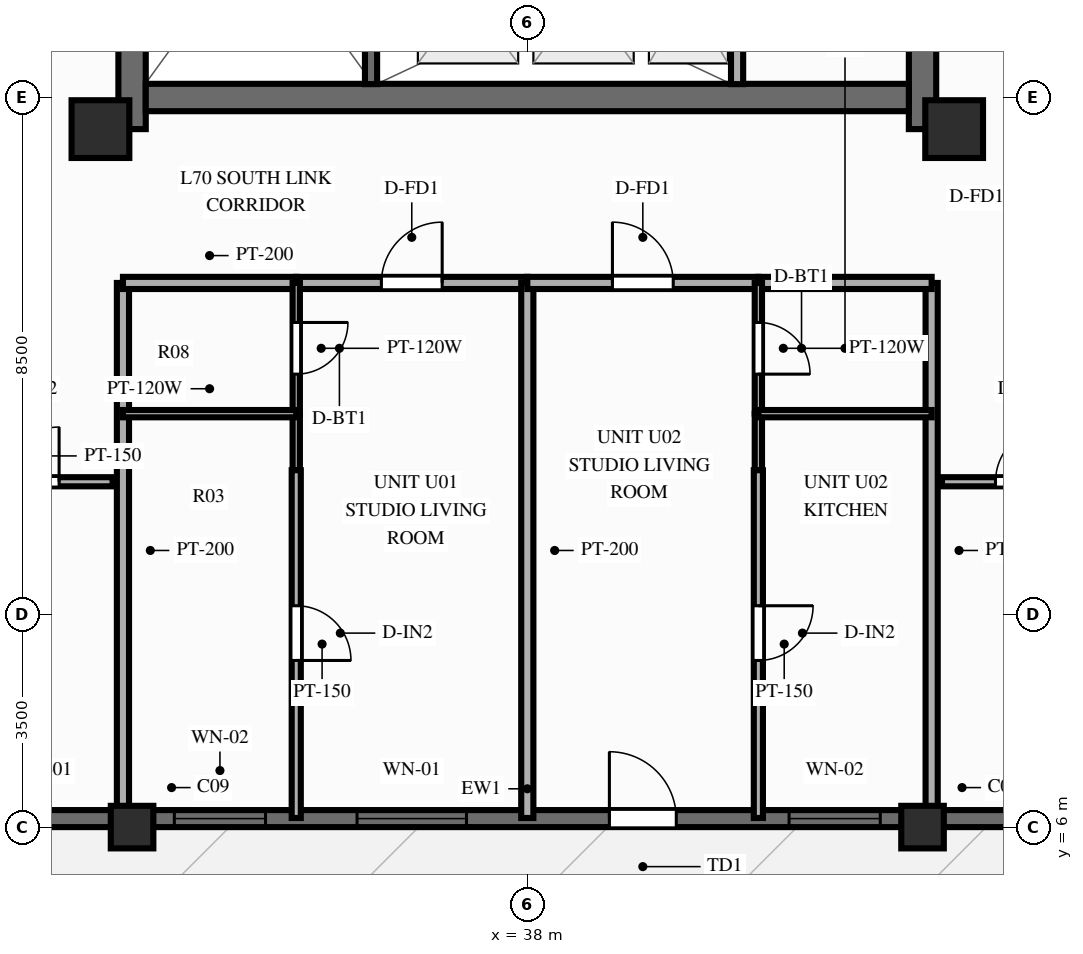
"""IFC4 building model, lengths in metres.
Left out: names, types, materials, properties, quantities, classifications, styles, units other than length and angle.
Written with IfcOpenShell. Run it as: python <this file> out.ifc"""

import sys

from ifc_helpers import new_model, si_unit, direction, frame, frame_2d, origin, origin_2d, place, context, subcontext, project, spatial, rectangle, extrude, source, transform, mapped, element, fill, save


model = new_model("IFC4")
c1 = context("Model", 3, precision=1e-05, world=origin(), true_north=direction((0.0, 1.0)))
c2 = subcontext(c1, "Body", "Model", "MODEL_VIEW")
j1 = project(units=[si_unit("LENGTHUNIT", "METRE"), si_unit("PLANEANGLEUNIT", "RADIAN")], contexts=[c1])
p1 = place(None, origin())
s1 = spatial("IfcSite", under=j1, at=p1, CompositionType="ELEMENT")
p2 = place(p1, origin())
s2 = spatial("IfcBuilding", under=s1, at=p2, CompositionType="ELEMENT")
p3 = place(p2, frame((0.0, 0.0, 226.2)))
s3 = spatial("IfcBuildingStorey", under=s2, at=p3, CompositionType="ELEMENT", Elevation=226.2)
p4 = place(p3, frame((31.5, 17.48, 0.0), z_axis=(0.0, 0.0, 1.0), x_axis=(0.0, 1.0, 0.0)))
e1 = element("IfcWall", 1, at=p4, inside=s3, PredefinedType="SHEAR", context=c2, shape_type="SweptSolid", body=[
    extrude(rectangle(XDim=19.04, YDim=0.45, at=frame_2d((9.52, 0.0))), origin(), (0.0, 0.0, 1.0), 3.9),
])
p5 = place(p4, frame((6.32, 0.0, 0.0)))
e2 = element("IfcOpeningElement", 2, at=p5, cuts=e1, PredefinedType="OPENING", context=c2, shape_type="SweptSolid", body=[
    extrude(rectangle(XDim=1.1, YDim=2.15, at=frame_2d((0.55, 1.075))), frame((0.0, 0.237, 0.0), z_axis=(0.0, -1.0, 0.0), x_axis=(1.0, 0.0, 0.0)), (0.0, 0.0, 1.0), 0.474),
])
p6 = place(p3, frame((44.5, 17.48, 0.0), z_axis=(0.0, 0.0, 1.0), x_axis=(0.0, 1.0, 0.0)))
e3 = element("IfcWall", 3, at=p6, inside=s3, PredefinedType="SHEAR", context=c2, shape_type="SweptSolid", body=[
    extrude(rectangle(XDim=19.04, YDim=0.45, at=frame_2d((9.52, 0.0))), origin(), (0.0, 0.0, 1.0), 3.9),
])
p7 = place(p6, frame((12.67, 0.0, 0.0), z_axis=(0.0, 0.0, 1.0), x_axis=(-1.0, 0.0, 0.0)))
e4 = element("IfcOpeningElement", 4, at=p7, cuts=e3, PredefinedType="OPENING", context=c2, shape_type="SweptSolid", body=[
    extrude(rectangle(XDim=1.1, YDim=2.15, at=frame_2d((0.55, 1.075))), frame((0.0, 0.237, 0.0), z_axis=(0.0, -1.0, 0.0), x_axis=(1.0, 0.0, 0.0)), (0.0, 0.0, 1.0), 0.474),
])
p8 = place(p3, frame((31.725, 18.0, 0.0), z_axis=(0.0, 0.0, 1.0), x_axis=(1.0, 0.0, 0.0)))
e5 = element("IfcWall", 5, at=p8, inside=s3, PredefinedType="SHEAR", context=c2, shape_type="SweptSolid", body=[
    extrude(rectangle(XDim=12.55, YDim=0.45, at=frame_2d((6.275, 0.0))), origin(), (0.0, 0.0, 1.0), 3.9),
])
m1 = source(origin(), c2, "Body", "SweptSolid", [
    extrude(rectangle(XDim=0.95, YDim=0.95, at=origin_2d()), origin(), (0.0, 0.0, 1.0), 3.9),
])
for number, where, z_axis, x_axis in (
    (6, (30.98, 17.48, 0.0), (0.0, 0.0, 1.0), (1.0, 0.0, 0.0)),
    (7, (45.02, 17.48, 0.0), (0.0, 0.0, 1.0), (1.0, 0.0, 0.0)),
):
    element("IfcColumn", number, at=place(p3, frame(where, z_axis=z_axis, x_axis=x_axis)), inside=s3, PredefinedType="COLUMN", context=c2, shape_type="MappedRepresentation", body=[
        mapped(m1, transform((0.0, 0.0, 0.0), scale=1.0)),
    ])
m2 = source(origin(), c2, "Body", "SweptSolid", [
    extrude(rectangle(XDim=0.7, YDim=0.7, at=origin_2d()), origin(), (0.0, 0.0, 1.0), 3.9),
])
for number, where, z_axis, x_axis in (
    (8, (31.5, 6.0, 0.0), (0.0, 0.0, 1.0), (1.0, 0.0, 0.0)),
    (9, (44.5, 6.0, 0.0), (0.0, 0.0, 1.0), (1.0, 0.0, 0.0)),
):
    element("IfcColumn", number, at=place(p3, frame(where, z_axis=z_axis, x_axis=x_axis)), inside=s3, PredefinedType="COLUMN", context=c2, shape_type="MappedRepresentation", body=[
        mapped(m2, transform((0.0, 0.0, 0.0), scale=1.0)),
    ])
p9 = place(p3, frame((26.75, 6.14, 0.0), z_axis=(0.0, 0.0, 1.0), x_axis=(1.0, 0.0, 0.0)))
e10 = element("IfcWall", 10, at=p9, inside=s3, PredefinedType="SOLIDWALL", context=c2, shape_type="SweptSolid", body=[
    extrude(rectangle(XDim=22.5, YDim=0.28, at=frame_2d((11.25, 0.0))), origin(), (0.0, 0.0, 1.0), 2.79),
])
p10 = place(p9, frame((1.475, 0.0, 0.85)))
e11 = element("IfcOpeningElement", 11, at=p10, cuts=e10, PredefinedType="OPENING", context=c2, shape_type="SweptSolid", body=[
    extrude(rectangle(XDim=1.8, YDim=1.65, at=frame_2d((0.9, 0.825))), frame((0.0, 0.152, 0.0), z_axis=(0.0, -1.0, 0.0), x_axis=(1.0, 0.0, 0.0)), (0.0, 0.0, 1.0), 0.304),
])
p11 = place(p9, frame((5.445, 0.0, 0.85)))
e12 = element("IfcOpeningElement", 12, at=p11, cuts=e10, PredefinedType="OPENING", context=c2, shape_type="SweptSolid", body=[
    extrude(rectangle(XDim=1.5, YDim=1.65, at=frame_2d((0.75, 0.825))), frame((0.0, 0.152, 0.0), z_axis=(0.0, -1.0, 0.0), x_axis=(1.0, 0.0, 0.0)), (0.0, 0.0, 1.0), 0.304),
])
p12 = place(p9, frame((8.45, 0.0, 0.85)))
e13 = element("IfcOpeningElement", 13, at=p12, cuts=e10, PredefinedType="OPENING", context=c2, shape_type="SweptSolid", body=[
    extrude(rectangle(XDim=1.8, YDim=1.65, at=frame_2d((0.9, 0.825))), frame((0.0, 0.152, 0.0), z_axis=(0.0, -1.0, 0.0), x_axis=(1.0, 0.0, 0.0)), (0.0, 0.0, 1.0), 0.304),
])
p13 = place(p9, frame((13.7, 0.0, 0.0), z_axis=(0.0, 0.0, 1.0), x_axis=(-1.0, 0.0, 0.0)))
e14 = element("IfcOpeningElement", 14, at=p13, cuts=e10, PredefinedType="OPENING", context=c2, shape_type="SweptSolid", body=[
    extrude(rectangle(XDim=1.1, YDim=2.15, at=frame_2d((0.55, 1.075))), frame((0.0, 0.152, 0.0), z_axis=(0.0, -1.0, 0.0), x_axis=(1.0, 0.0, 0.0)), (0.0, 0.0, 1.0), 0.304),
])
p14 = place(p9, frame((15.555, 0.0, 0.85)))
e15 = element("IfcOpeningElement", 15, at=p14, cuts=e10, PredefinedType="OPENING", context=c2, shape_type="SweptSolid", body=[
    extrude(rectangle(XDim=1.5, YDim=1.65, at=frame_2d((0.75, 0.825))), frame((0.0, 0.152, 0.0), z_axis=(0.0, -1.0, 0.0), x_axis=(1.0, 0.0, 0.0)), (0.0, 0.0, 1.0), 0.304),
])
p15 = place(p9, frame((19.225, 0.0, 0.85)))
e16 = element("IfcOpeningElement", 16, at=p15, cuts=e10, PredefinedType="OPENING", context=c2, shape_type="SweptSolid", body=[
    extrude(rectangle(XDim=1.8, YDim=1.65, at=frame_2d((0.9, 0.825))), frame((0.0, 0.152, 0.0), z_axis=(0.0, -1.0, 0.0), x_axis=(1.0, 0.0, 0.0)), (0.0, 0.0, 1.0), 0.304),
])
p16 = place(p3, frame((41.45, 18.22, 0.0), z_axis=(0.0, 0.0, 1.0), x_axis=(0.0, 1.0, 0.0)))
e17 = element("IfcWall", 17, at=p16, inside=s3, PredefinedType="PARTITIONING", context=c2, shape_type="SweptSolid", body=[
    extrude(rectangle(XDim=2.96, YDim=0.2, at=frame_2d((1.48, 0.0))), origin(), (0.0, 0.0, 1.0), 3.69),
])
p17 = place(p3, frame((35.43, 18.22, 0.0), z_axis=(0.0, 0.0, 1.0), x_axis=(0.0, 1.0, 0.0)))
e18 = element("IfcWall", 18, at=p17, inside=s3, PredefinedType="SOLIDWALL", context=c2, shape_type="SweptSolid", body=[
    extrude(rectangle(XDim=7.22, YDim=0.2, at=frame_2d((3.61, 0.0))), origin(), (0.0, 0.0, 1.0), 3.69),
])
p18 = place(p17, frame((6.68, 0.0, 0.0), z_axis=(0.0, 0.0, 1.0), x_axis=(-1.0, 0.0, 0.0)))
e19 = element("IfcOpeningElement", 19, at=p18, cuts=e18, PredefinedType="OPENING", context=c2, shape_type="SweptSolid", body=[
    extrude(rectangle(XDim=1.1, YDim=2.15, at=frame_2d((0.55, 1.075))), frame((0.0, 0.112, 0.0), z_axis=(0.0, -1.0, 0.0), x_axis=(1.0, 0.0, 0.0)), (0.0, 0.0, 1.0), 0.224),
])
p19 = place(p3, frame((28.85, 11.68, 0.0), z_axis=(0.0, 0.0, 1.0), x_axis=(1.0, 0.0, 0.0)))
e20 = element("IfcWall", 20, at=p19, inside=s3, PredefinedType="PARTITIONING", context=c2, shape_type="SweptSolid", body=[
    extrude(rectangle(XDim=2.33, YDim=0.15, at=frame_2d((1.165, 0.0))), origin(), (0.0, 0.0, 1.0), 3.69),
])
p20 = place(p19, frame((0.55, 0.0, 0.0)))
e21 = element("IfcOpeningElement", 21, at=p20, cuts=e20, PredefinedType="OPENING", context=c2, shape_type="SweptSolid", body=[
    extrude(rectangle(XDim=0.9, YDim=2.1, at=frame_2d((0.45, 1.05))), frame((0.0, 0.087, 0.0), z_axis=(0.0, -1.0, 0.0), x_axis=(1.0, 0.0, 0.0)), (0.0, 0.0, 1.0), 0.174),
])
p21 = place(p3, frame((44.82, 11.68, 0.0), z_axis=(0.0, 0.0, 1.0), x_axis=(1.0, 0.0, 0.0)))
e22 = element("IfcWall", 22, at=p21, inside=s3, PredefinedType="PARTITIONING", context=c2, shape_type="SweptSolid", body=[
    extrude(rectangle(XDim=2.33, YDim=0.15, at=frame_2d((1.165, 0.0))), origin(), (0.0, 0.0, 1.0), 3.69),
])
p22 = place(p21, frame((0.88, 0.0, 0.0)))
e23 = element("IfcOpeningElement", 23, at=p22, cuts=e22, PredefinedType="OPENING", context=c2, shape_type="SweptSolid", body=[
    extrude(rectangle(XDim=0.9, YDim=2.1, at=frame_2d((0.45, 1.05))), frame((0.0, 0.087, 0.0), z_axis=(0.0, -1.0, 0.0), x_axis=(1.0, 0.0, 0.0)), (0.0, 0.0, 1.0), 0.174),
])
for number, where, z_axis, x_axis in (
    (24, (31.35, 14.95, 0.0), (0.0, 0.0, 1.0), (0.0, -1.0, 0.0)),
    (25, (44.65, 14.95, 0.0), (0.0, 0.0, 1.0), (0.0, -1.0, 0.0)),
):
    element("IfcWall", number, at=place(p3, frame(where, z_axis=z_axis, x_axis=x_axis)), inside=s3, PredefinedType="PARTITIONING", context=c2, shape_type="SweptSolid", body=[
        extrude(rectangle(XDim=8.8, YDim=0.2, at=frame_2d((4.4, 0.0))), origin(), (0.0, 0.0, 1.0), 2.79),
    ])
p23 = place(p3, frame((31.35, 14.95, 0.0), z_axis=(0.0, 0.0, 1.0), x_axis=(1.0, 0.0, 0.0)))
e26 = element("IfcWall", 26, at=p23, inside=s3, PredefinedType="PARTITIONING", context=c2, shape_type="SweptSolid", body=[
    extrude(rectangle(XDim=2.85, YDim=0.2, at=frame_2d((1.425, 0.0))), origin(), (0.0, 0.0, 1.0), 3.69),
])
p24 = place(p3, frame((34.2, 14.95, 0.0), z_axis=(0.0, 0.0, 1.0), x_axis=(1.0, 0.0, 0.0)))
e27 = element("IfcWall", 27, at=p24, inside=s3, PredefinedType="PARTITIONING", context=c2, shape_type="SweptSolid", body=[
    extrude(rectangle(XDim=3.8, YDim=0.2, at=frame_2d((1.9, 0.0))), origin(), (0.0, 0.0, 1.0), 3.69),
])
p25 = place(p24, frame((1.4, 0.0, 0.0)))
e28 = element("IfcOpeningElement", 28, at=p25, cuts=e27, PredefinedType="OPENING", context=c2, shape_type="SweptSolid", body=[
    extrude(rectangle(XDim=1.0, YDim=2.15, at=frame_2d((0.5, 1.075))), frame((0.0, 0.112, 0.0), z_axis=(0.0, -1.0, 0.0), x_axis=(1.0, 0.0, 0.0)), (0.0, 0.0, 1.0), 0.224),
])
p26 = place(p3, frame((34.2, 14.95, 0.0), z_axis=(0.0, 0.0, 1.0), x_axis=(0.0, -1.0, 0.0)))
e29 = element("IfcWall", 29, at=p26, inside=s3, PredefinedType="PARTITIONING", context=c2, shape_type="SweptSolid", body=[
    extrude(rectangle(XDim=2.15, YDim=0.12, at=frame_2d((1.075, 0.0))), origin(), (0.0, 0.0, 1.0), 3.69),
])
p27 = place(p26, frame((0.65, 0.0, 0.0)))
e30 = element("IfcOpeningElement", 30, at=p27, cuts=e29, PredefinedType="OPENING", context=c2, shape_type="SweptSolid", body=[
    extrude(rectangle(XDim=0.85, YDim=2.05, at=frame_2d((0.425, 1.025))), frame((0.0, 0.072, 0.0), z_axis=(0.0, -1.0, 0.0), x_axis=(1.0, 0.0, 0.0)), (0.0, 0.0, 1.0), 0.144),
])
p28 = place(p3, frame((34.2, 12.8, 0.0), z_axis=(0.0, 0.0, 1.0), x_axis=(0.0, -1.0, 0.0)))
e31 = element("IfcWall", 31, at=p28, inside=s3, PredefinedType="PARTITIONING", context=c2, shape_type="SweptSolid", body=[
    extrude(rectangle(XDim=0.93, YDim=0.12, at=frame_2d((0.465, 0.0))), origin(), (0.0, 0.0, 1.0), 3.69),
])
p29 = place(p3, frame((31.35, 12.8, 0.0), z_axis=(0.0, 0.0, 1.0), x_axis=(1.0, 0.0, 0.0)))
e32 = element("IfcWall", 32, at=p29, inside=s3, PredefinedType="PARTITIONING", context=c2, shape_type="SweptSolid", body=[
    extrude(rectangle(XDim=2.85, YDim=0.12, at=frame_2d((1.425, 0.0))), origin(), (0.0, 0.0, 1.0), 3.69),
])
p30 = place(p3, frame((34.2, 11.87, 0.0), z_axis=(0.0, 0.0, 1.0), x_axis=(0.0, -1.0, 0.0)))
e33 = element("IfcWall", 33, at=p30, inside=s3, PredefinedType="PARTITIONING", context=c2, shape_type="SweptSolid", body=[
    extrude(rectangle(XDim=5.72, YDim=0.15, at=frame_2d((2.86, 0.0))), origin(), (0.0, 0.0, 1.0), 3.69),
])
p31 = place(p30, frame((2.229, 0.0, 0.0)))
e34 = element("IfcOpeningElement", 34, at=p31, cuts=e33, PredefinedType="OPENING", context=c2, shape_type="SweptSolid", body=[
    extrude(rectangle(XDim=0.9, YDim=2.1, at=frame_2d((0.45, 1.05))), frame((0.0, 0.087, 0.0), z_axis=(0.0, -1.0, 0.0), x_axis=(1.0, 0.0, 0.0)), (0.0, 0.0, 1.0), 0.174),
])
p32 = place(p3, frame((38.0, 14.95, 0.0), z_axis=(0.0, 0.0, 1.0), x_axis=(0.0, -1.0, 0.0)))
e35 = element("IfcWall", 35, at=p32, inside=s3, PredefinedType="PARTITIONING", context=c2, shape_type="SweptSolid", body=[
    extrude(rectangle(XDim=8.8, YDim=0.2, at=frame_2d((4.4, 0.0))), origin(), (0.0, 0.0, 1.0), 3.69),
])
p33 = place(p3, frame((38.0, 14.95, 0.0), z_axis=(0.0, 0.0, 1.0), x_axis=(1.0, 0.0, 0.0)))
e36 = element("IfcWall", 36, at=p33, inside=s3, PredefinedType="PARTITIONING", context=c2, shape_type="SweptSolid", body=[
    extrude(rectangle(XDim=3.8, YDim=0.2, at=frame_2d((1.9, 0.0))), origin(), (0.0, 0.0, 1.0), 3.69),
])
p34 = place(p33, frame((1.4, 0.0, 0.0)))
e37 = element("IfcOpeningElement", 37, at=p34, cuts=e36, PredefinedType="OPENING", context=c2, shape_type="SweptSolid", body=[
    extrude(rectangle(XDim=1.0, YDim=2.15, at=frame_2d((0.5, 1.075))), frame((0.0, 0.112, 0.0), z_axis=(0.0, -1.0, 0.0), x_axis=(1.0, 0.0, 0.0)), (0.0, 0.0, 1.0), 0.224),
])
p35 = place(p3, frame((41.8, 14.95, 0.0), z_axis=(0.0, 0.0, 1.0), x_axis=(1.0, 0.0, 0.0)))
e38 = element("IfcWall", 38, at=p35, inside=s3, PredefinedType="PARTITIONING", context=c2, shape_type="SweptSolid", body=[
    extrude(rectangle(XDim=2.85, YDim=0.2, at=frame_2d((1.425, 0.0))), origin(), (0.0, 0.0, 1.0), 3.69),
])
p36 = place(p3, frame((41.8, 14.95, 0.0), z_axis=(0.0, 0.0, 1.0), x_axis=(0.0, -1.0, 0.0)))
e39 = element("IfcWall", 39, at=p36, inside=s3, PredefinedType="PARTITIONING", context=c2, shape_type="SweptSolid", body=[
    extrude(rectangle(XDim=2.15, YDim=0.12, at=frame_2d((1.075, 0.0))), origin(), (0.0, 0.0, 1.0), 3.69),
])
p37 = place(p36, frame((0.65, 0.0, 0.0)))
e40 = element("IfcOpeningElement", 40, at=p37, cuts=e39, PredefinedType="OPENING", context=c2, shape_type="SweptSolid", body=[
    extrude(rectangle(XDim=0.85, YDim=2.05, at=frame_2d((0.425, 1.025))), frame((0.0, 0.072, 0.0), z_axis=(0.0, -1.0, 0.0), x_axis=(1.0, 0.0, 0.0)), (0.0, 0.0, 1.0), 0.144),
])
p38 = place(p3, frame((41.8, 12.8, 0.0), z_axis=(0.0, 0.0, 1.0), x_axis=(0.0, -1.0, 0.0)))
e41 = element("IfcWall", 41, at=p38, inside=s3, PredefinedType="PARTITIONING", context=c2, shape_type="SweptSolid", body=[
    extrude(rectangle(XDim=0.93, YDim=0.12, at=frame_2d((0.465, 0.0))), origin(), (0.0, 0.0, 1.0), 3.69),
])
p39 = place(p3, frame((41.8, 12.8, 0.0), z_axis=(0.0, 0.0, 1.0), x_axis=(1.0, 0.0, 0.0)))
e42 = element("IfcWall", 42, at=p39, inside=s3, PredefinedType="PARTITIONING", context=c2, shape_type="SweptSolid", body=[
    extrude(rectangle(XDim=2.85, YDim=0.12, at=frame_2d((1.425, 0.0))), origin(), (0.0, 0.0, 1.0), 3.69),
])
p40 = place(p3, frame((41.8, 11.87, 0.0), z_axis=(0.0, 0.0, 1.0), x_axis=(0.0, -1.0, 0.0)))
e43 = element("IfcWall", 43, at=p40, inside=s3, PredefinedType="PARTITIONING", context=c2, shape_type="SweptSolid", body=[
    extrude(rectangle(XDim=5.72, YDim=0.15, at=frame_2d((2.86, 0.0))), origin(), (0.0, 0.0, 1.0), 3.69),
])
p41 = place(p40, frame((2.229, 0.0, 0.0)))
e44 = element("IfcOpeningElement", 44, at=p41, cuts=e43, PredefinedType="OPENING", context=c2, shape_type="SweptSolid", body=[
    extrude(rectangle(XDim=0.9, YDim=2.1, at=frame_2d((0.45, 1.05))), frame((0.0, 0.087, 0.0), z_axis=(0.0, -1.0, 0.0), x_axis=(1.0, 0.0, 0.0)), (0.0, 0.0, 1.0), 0.174),
])
m3 = source(origin(), c2, "Body", "SweptSolid", [
    extrude(rectangle(XDim=1.5, YDim=1.65, at=frame_2d((0.75, 0.825))), frame((0.0, 0.03, 0.0), z_axis=(0.0, -1.0, 0.0), x_axis=(1.0, 0.0, 0.0)), (0.0, 0.0, 1.0), 0.06),
])
p42 = place(p11, origin())
e45 = element("IfcWindow", 45, at=p42, inside=s3, PartitioningType="SINGLE_PANEL", PredefinedType="WINDOW", context=c2, shape_type="MappedRepresentation", body=[
    mapped(m3, transform((0.0, 0.0, 0.0), scale=1.0)),
])
fill(e12, e45)
m4 = source(origin(), c2, "Body", "SweptSolid", [
    extrude(rectangle(XDim=1.8, YDim=1.65, at=frame_2d((0.9, 0.825))), frame((0.0, 0.03, 0.0), z_axis=(0.0, -1.0, 0.0), x_axis=(1.0, 0.0, 0.0)), (0.0, 0.0, 1.0), 0.06),
])
p43 = place(p12, origin())
e46 = element("IfcWindow", 46, at=p43, inside=s3, PartitioningType="SINGLE_PANEL", PredefinedType="WINDOW", context=c2, shape_type="MappedRepresentation", body=[
    mapped(m4, transform((0.0, 0.0, 0.0), scale=1.0)),
])
fill(e13, e46)
m5 = source(origin(), c2, "Body", "SweptSolid", [
    extrude(rectangle(XDim=1.1, YDim=2.15, at=frame_2d((0.55, 1.075))), frame((0.0, 0.025, 0.0), z_axis=(0.0, -1.0, 0.0), x_axis=(1.0, 0.0, 0.0)), (0.0, 0.0, 1.0), 0.05),
])
p44 = place(p13, origin())
e47 = element("IfcDoor", 47, at=p44, inside=s3, OperationType="SINGLE_SWING_RIGHT", PredefinedType="DOOR", context=c2, shape_type="MappedRepresentation", body=[
    mapped(m5, transform((0.0, 0.0, 0.0), scale=1.0)),
])
fill(e14, e47)
p45 = place(p14, origin())
e48 = element("IfcWindow", 48, at=p45, inside=s3, PartitioningType="SINGLE_PANEL", PredefinedType="WINDOW", context=c2, shape_type="MappedRepresentation", body=[
    mapped(m3, transform((0.0, 0.0, 0.0), scale=1.0)),
])
fill(e15, e48)
m6 = source(origin(), c2, "Body", "SweptSolid", [
    extrude(rectangle(XDim=0.9, YDim=2.1, at=frame_2d((0.45, 1.05))), frame((0.0, 0.025, 0.0), z_axis=(0.0, -1.0, 0.0), x_axis=(1.0, 0.0, 0.0)), (0.0, 0.0, 1.0), 0.05),
])
p46 = place(p20, origin())
e49 = element("IfcDoor", 49, at=p46, inside=s3, OperationType="SINGLE_SWING_RIGHT", PredefinedType="DOOR", context=c2, shape_type="MappedRepresentation", body=[
    mapped(m6, transform((0.0, 0.0, 0.0), scale=1.0)),
])
fill(e21, e49)
p47 = place(p22, origin())
e50 = element("IfcDoor", 50, at=p47, inside=s3, OperationType="SINGLE_SWING_RIGHT", PredefinedType="DOOR", context=c2, shape_type="MappedRepresentation", body=[
    mapped(m6, transform((0.0, 0.0, 0.0), scale=1.0)),
])
fill(e23, e50)
m7 = source(origin(), c2, "Body", "SweptSolid", [
    extrude(rectangle(XDim=1.0, YDim=2.15, at=frame_2d((0.5, 1.075))), frame((0.0, 0.025, 0.0), z_axis=(0.0, -1.0, 0.0), x_axis=(1.0, 0.0, 0.0)), (0.0, 0.0, 1.0), 0.05),
])
p48 = place(p25, origin())
e51 = element("IfcDoor", 51, at=p48, inside=s3, OperationType="SINGLE_SWING_RIGHT", PredefinedType="DOOR", context=c2, shape_type="MappedRepresentation", body=[
    mapped(m7, transform((0.0, 0.0, 0.0), scale=1.0)),
])
fill(e28, e51)
m8 = source(origin(), c2, "Body", "SweptSolid", [
    extrude(rectangle(XDim=0.85, YDim=2.05, at=frame_2d((0.425, 1.025))), frame((0.0, 0.025, 0.0), z_axis=(0.0, -1.0, 0.0), x_axis=(1.0, 0.0, 0.0)), (0.0, 0.0, 1.0), 0.05),
])
p49 = place(p27, origin())
e52 = element("IfcDoor", 52, at=p49, inside=s3, OperationType="SINGLE_SWING_LEFT", PredefinedType="DOOR", context=c2, shape_type="MappedRepresentation", body=[
    mapped(m8, transform((0.0, 0.0, 0.0), scale=1.0)),
])
fill(e30, e52)
p50 = place(p31, origin())
e53 = element("IfcDoor", 53, at=p50, inside=s3, OperationType="SINGLE_SWING_RIGHT", PredefinedType="DOOR", context=c2, shape_type="MappedRepresentation", body=[
    mapped(m6, transform((0.0, 0.0, 0.0), scale=1.0)),
])
fill(e34, e53)
p51 = place(p34, origin())
e54 = element("IfcDoor", 54, at=p51, inside=s3, OperationType="SINGLE_SWING_LEFT", PredefinedType="DOOR", context=c2, shape_type="MappedRepresentation", body=[
    mapped(m7, transform((0.0, 0.0, 0.0), scale=1.0)),
])
fill(e37, e54)
p52 = place(p37, origin())
e55 = element("IfcDoor", 55, at=p52, inside=s3, OperationType="SINGLE_SWING_RIGHT", PredefinedType="DOOR", context=c2, shape_type="MappedRepresentation", body=[
    mapped(m8, transform((0.0, 0.0, 0.0), scale=1.0)),
])
fill(e40, e55)
p53 = place(p41, origin())
e56 = element("IfcDoor", 56, at=p53, inside=s3, OperationType="SINGLE_SWING_LEFT", PredefinedType="DOOR", context=c2, shape_type="MappedRepresentation", body=[
    mapped(m6, transform((0.0, 0.0, 0.0), scale=1.0)),
])
fill(e44, e56)
save(model, sys.argv[1])
